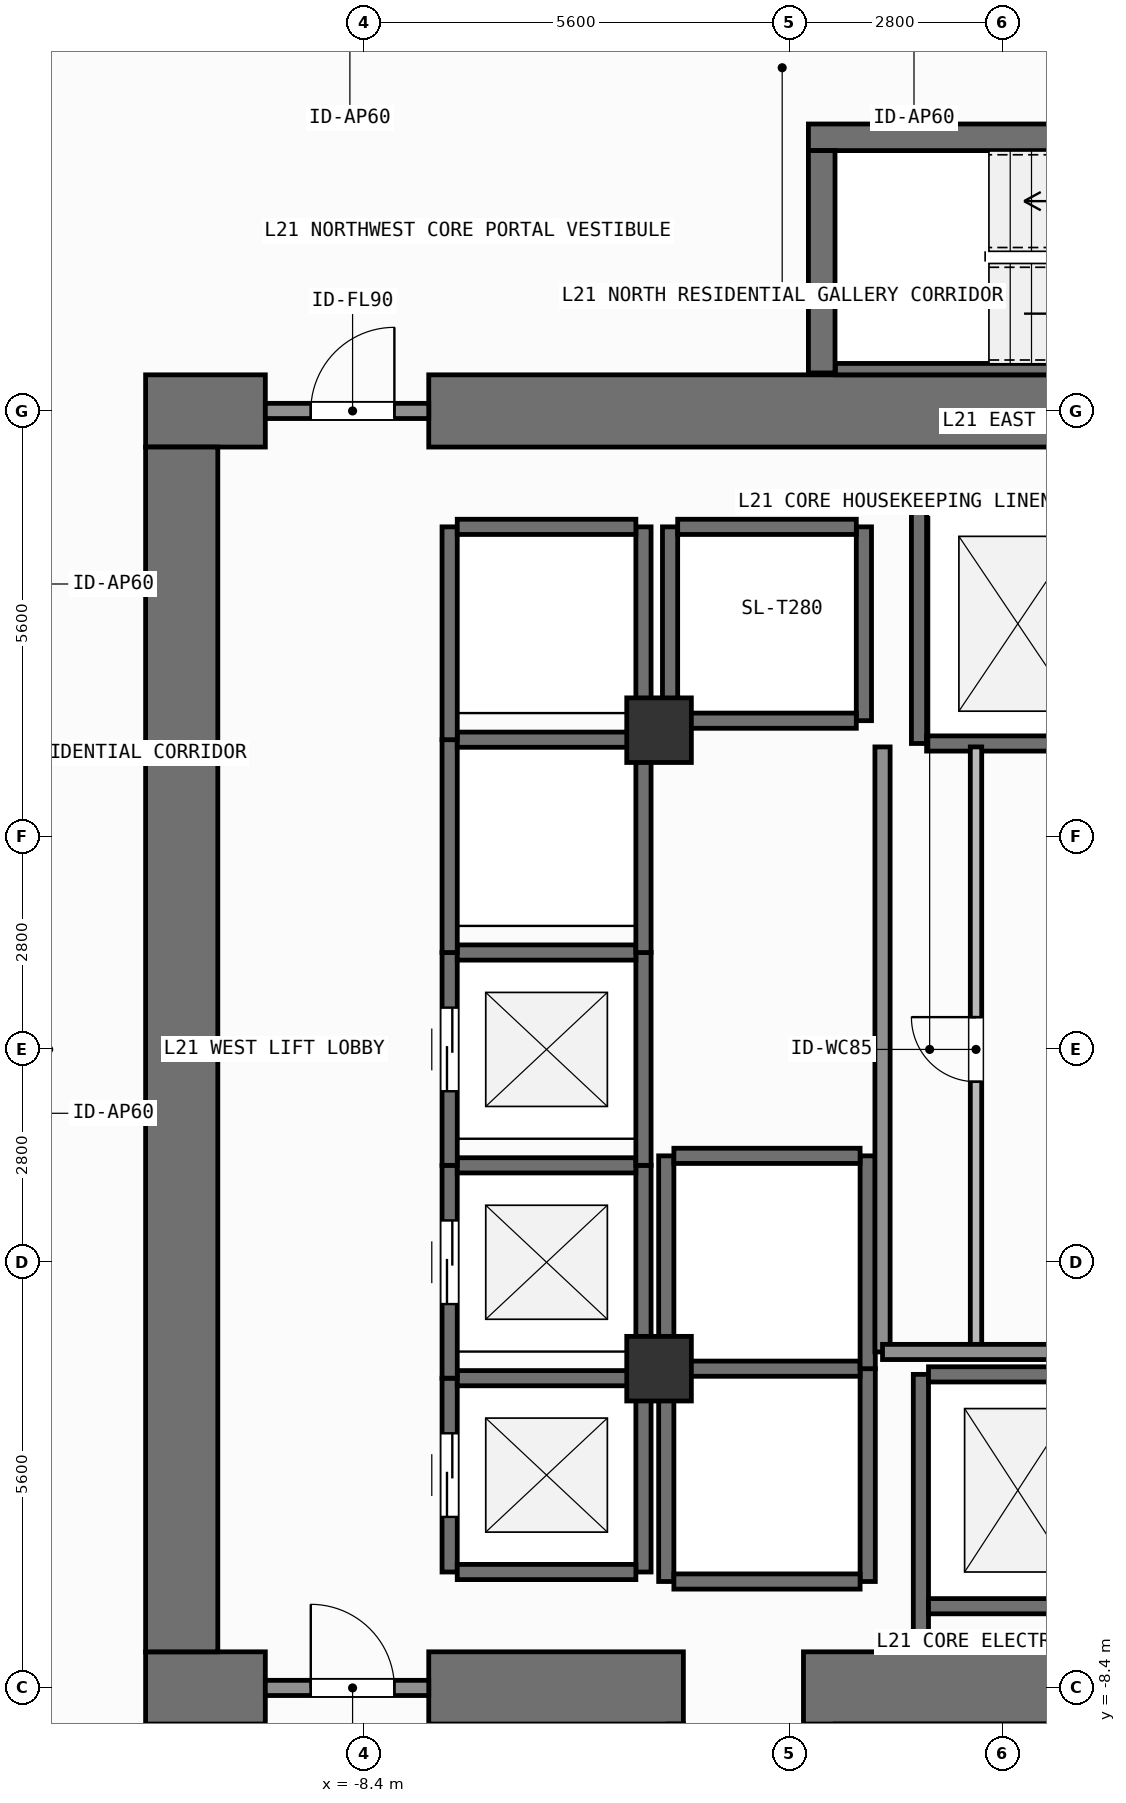
"""IFC4 building model, lengths in metres.
Left out: names, types, materials, properties, quantities, classifications, styles, units other than length and angle.
Written with IfcOpenShell. Run it as: python <this file> out.ifc"""

import sys

from ifc_helpers import new_model, si_unit, direction, frame, frame_2d, origin, origin_2d, place, context, subcontext, project, spatial, rectangle, extrude, element, fill, save


model = new_model("IFC4")
c1 = context("Model", 3, precision=1e-05, world=origin(), true_north=direction((0.0, 1.0)))
c2 = subcontext(c1, "Body", "Model", "MODEL_VIEW")
j1 = project(units=[si_unit("LENGTHUNIT", "METRE"), si_unit("PLANEANGLEUNIT", "RADIAN")], contexts=[c1])
p1 = place(None, origin())
s1 = spatial("IfcSite", under=j1, at=p1, CompositionType="ELEMENT")
p2 = place(p1, origin())
s2 = spatial("IfcBuilding", under=s1, at=p2, CompositionType="ELEMENT")
p3 = place(p2, frame((0.0, 0.0, 85.2)))
s3 = spatial("IfcBuildingStorey", under=s2, at=p3, CompositionType="ELEMENT", Elevation=85.2)
p4 = place(p3, frame((-11.275, -8.4, 0.0), z_axis=(0.0, 0.0, 1.0), x_axis=(1.0, 0.0, 0.0)))
e1 = element("IfcWall", 1, at=p4, inside=s3, PredefinedType="SHEAR", context=c2, shape_type="SweptSolid", body=[
    extrude(rectangle(XDim=1.575, YDim=0.95, at=frame_2d((0.788, 0.0))), origin(), (0.0, 0.0, 1.0), 3.9),
])
p5 = place(p3, frame((-7.55, -8.4, 0.0), z_axis=(0.0, 0.0, 1.0), x_axis=(1.0, 0.0, 0.0)))
e2 = element("IfcWall", 2, at=p5, inside=s3, PredefinedType="SHEAR", context=c2, shape_type="SweptSolid", body=[
    extrude(rectangle(XDim=3.35, YDim=0.95, at=frame_2d((1.675, 0.0))), origin(), (0.0, 0.0, 1.0), 3.9),
])
p6 = place(p3, frame((-2.62, -8.4, 0.0), z_axis=(0.0, 0.0, 1.0), x_axis=(1.0, 0.0, 0.0)))
e3 = element("IfcWall", 3, at=p6, inside=s3, PredefinedType="SHEAR", context=c2, shape_type="SweptSolid", body=[
    extrude(rectangle(XDim=7.27, YDim=0.95, at=frame_2d((3.635, 0.0))), origin(), (0.0, 0.0, 1.0), 3.9),
])
p7 = place(p3, frame((-11.275, 8.4, 0.0), z_axis=(0.0, 0.0, 1.0), x_axis=(1.0, 0.0, 0.0)))
e4 = element("IfcWall", 4, at=p7, inside=s3, PredefinedType="SHEAR", context=c2, shape_type="SweptSolid", body=[
    extrude(rectangle(XDim=1.575, YDim=0.95, at=frame_2d((0.788, 0.0))), origin(), (0.0, 0.0, 1.0), 3.9),
])
p8 = place(p3, frame((-7.55, 8.4, 0.0), z_axis=(0.0, 0.0, 1.0), x_axis=(1.0, 0.0, 0.0)))
e5 = element("IfcWall", 5, at=p8, inside=s3, PredefinedType="SHEAR", context=c2, shape_type="SweptSolid", body=[
    extrude(rectangle(XDim=16.425, YDim=0.95, at=frame_2d((8.212, 0.0))), origin(), (0.0, 0.0, 1.0), 3.9),
])
p9 = place(p3, frame((-10.8, -7.925, 0.0), z_axis=(0.0, 0.0, 1.0), x_axis=(0.0, 1.0, 0.0)))
e6 = element("IfcWall", 6, at=p9, inside=s3, PredefinedType="SHEAR", context=c2, shape_type="SweptSolid", body=[
    extrude(rectangle(XDim=15.85, YDim=0.95, at=frame_2d((7.925, 0.0))), origin(), (0.0, 0.0, 1.0), 3.9),
])
p10 = place(p3, frame((-2.555, 12.0, 0.0), z_axis=(0.0, 0.0, 1.0), x_axis=(1.0, 0.0, 0.0)))
e7 = element("IfcWall", 7, at=p10, inside=s3, PredefinedType="SHEAR", context=c2, shape_type="SweptSolid", body=[
    extrude(rectangle(XDim=7.31, YDim=0.35, at=frame_2d((3.655, 0.0))), origin(), (0.0, 0.0, 1.0), 3.9),
])
p11 = place(p3, frame((-2.2, 8.95, 0.0), z_axis=(0.0, 0.0, 1.0), x_axis=(1.0, 0.0, 0.0)))
e8 = element("IfcWall", 8, at=p11, inside=s3, PredefinedType="SHEAR", context=c2, shape_type="SweptSolid", body=[
    extrude(rectangle(XDim=6.6, YDim=0.15, at=frame_2d((3.3, 0.0))), origin(), (0.0, 0.0, 1.0), 3.9),
])
p12 = place(p3, frame((-2.38, 8.9, 0.0), z_axis=(0.0, 0.0, 1.0), x_axis=(0.0, 1.0, 0.0)))
e9 = element("IfcWall", 9, at=p12, inside=s3, PredefinedType="SHEAR", context=c2, shape_type="SweptSolid", body=[
    extrude(rectangle(XDim=2.925, YDim=0.35, at=frame_2d((1.462, 0.0))), origin(), (0.0, 0.0, 1.0), 3.9),
])
for number, where, z_axis, x_axis in (
    (10, (-4.52, -4.2, 0.0), (0.0, 0.0, 1.0), (1.0, 0.0, 0.0)),
    (11, (-4.52, 4.2, 0.0), (0.0, 0.0, 1.0), (1.0, 0.0, 0.0)),
):
    element("IfcColumn", number, at=place(p3, frame(where, z_axis=z_axis, x_axis=x_axis)), inside=s3, PredefinedType="COLUMN", context=c2, shape_type="SweptSolid", body=[
        extrude(rectangle(XDim=0.85, YDim=0.85, at=origin_2d()), origin(), (0.0, 0.0, 1.0), 3.9),
    ])
p13 = place(p3, frame((-7.275, -6.875, 0.0), z_axis=(0.0, 0.0, 1.0), x_axis=(0.0, 1.0, 0.0)))
e12 = element("IfcWall", 12, at=p13, inside=s3, PredefinedType="SHEAR", context=c2, shape_type="SweptSolid", body=[
    extrude(rectangle(XDim=2.55, YDim=0.2, at=frame_2d((1.275, 0.0))), origin(), (0.0, 0.0, 1.0), 3.68),
])
p14 = place(p13, frame((0.725, 0.0, 0.0)))
e13 = element("IfcOpeningElement", 13, at=p14, cuts=e12, PredefinedType="OPENING", context=c2, shape_type="SweptSolid", body=[
    extrude(rectangle(XDim=1.1, YDim=2.2, at=frame_2d((0.55, 1.1))), frame((0.0, 0.11, 0.0), z_axis=(0.0, -1.0, 0.0), x_axis=(1.0, 0.0, 0.0)), (0.0, 0.0, 1.0), 0.22),
])
p15 = place(p3, frame((-4.725, -6.875, 0.0), z_axis=(0.0, 0.0, 1.0), x_axis=(0.0, 1.0, 0.0)))
e14 = element("IfcWall", 14, at=p15, inside=s3, PredefinedType="SHEAR", context=c2, shape_type="SweptSolid", body=[
    extrude(rectangle(XDim=2.55, YDim=0.2, at=frame_2d((1.275, 0.0))), origin(), (0.0, 0.0, 1.0), 3.68),
])
for number, where, z_axis, x_axis in (
    (15, (-7.175, -6.875, 0.0), (0.0, 0.0, 1.0), (1.0, 0.0, 0.0)),
    (16, (-7.175, -4.325, 0.0), (0.0, 0.0, 1.0), (1.0, 0.0, 0.0)),
):
    element("IfcWall", number, at=place(p3, frame(where, z_axis=z_axis, x_axis=x_axis)), inside=s3, PredefinedType="SHEAR", context=c2, shape_type="SweptSolid", body=[
        extrude(rectangle(XDim=2.35, YDim=0.2, at=frame_2d((1.175, 0.0))), origin(), (0.0, 0.0, 1.0), 3.68),
    ])
p16 = place(p3, frame((-7.275, -4.325, 0.0), z_axis=(0.0, 0.0, 1.0), x_axis=(0.0, 1.0, 0.0)))
e17 = element("IfcWall", 17, at=p16, inside=s3, PredefinedType="SHEAR", context=c2, shape_type="SweptSolid", body=[
    extrude(rectangle(XDim=2.8, YDim=0.2, at=frame_2d((1.4, 0.0))), origin(), (0.0, 0.0, 1.0), 3.68),
])
p17 = place(p16, frame((0.975, 0.0, 0.0)))
e18 = element("IfcOpeningElement", 18, at=p17, cuts=e17, PredefinedType="OPENING", context=c2, shape_type="SweptSolid", body=[
    extrude(rectangle(XDim=1.1, YDim=2.2, at=frame_2d((0.55, 1.1))), frame((0.0, 0.11, 0.0), z_axis=(0.0, -1.0, 0.0), x_axis=(1.0, 0.0, 0.0)), (0.0, 0.0, 1.0), 0.22),
])
p18 = place(p3, frame((-4.725, -4.325, 0.0), z_axis=(0.0, 0.0, 1.0), x_axis=(0.0, 1.0, 0.0)))
e19 = element("IfcWall", 19, at=p18, inside=s3, PredefinedType="SHEAR", context=c2, shape_type="SweptSolid", body=[
    extrude(rectangle(XDim=2.8, YDim=0.2, at=frame_2d((1.4, 0.0))), origin(), (0.0, 0.0, 1.0), 3.68),
])
p19 = place(p3, frame((-7.175, -1.525, 0.0), z_axis=(0.0, 0.0, 1.0), x_axis=(1.0, 0.0, 0.0)))
e20 = element("IfcWall", 20, at=p19, inside=s3, PredefinedType="SHEAR", context=c2, shape_type="SweptSolid", body=[
    extrude(rectangle(XDim=2.35, YDim=0.2, at=frame_2d((1.175, 0.0))), origin(), (0.0, 0.0, 1.0), 3.68),
])
p20 = place(p3, frame((-7.275, -1.525, 0.0), z_axis=(0.0, 0.0, 1.0), x_axis=(0.0, 1.0, 0.0)))
e21 = element("IfcWall", 21, at=p20, inside=s3, PredefinedType="SHEAR", context=c2, shape_type="SweptSolid", body=[
    extrude(rectangle(XDim=2.8, YDim=0.2, at=frame_2d((1.4, 0.0))), origin(), (0.0, 0.0, 1.0), 3.68),
])
p21 = place(p20, frame((0.975, 0.0, 0.0)))
e22 = element("IfcOpeningElement", 22, at=p21, cuts=e21, PredefinedType="OPENING", context=c2, shape_type="SweptSolid", body=[
    extrude(rectangle(XDim=1.1, YDim=2.2, at=frame_2d((0.55, 1.1))), frame((0.0, 0.11, 0.0), z_axis=(0.0, -1.0, 0.0), x_axis=(1.0, 0.0, 0.0)), (0.0, 0.0, 1.0), 0.22),
])
p22 = place(p3, frame((-4.725, -1.525, 0.0), z_axis=(0.0, 0.0, 1.0), x_axis=(0.0, 1.0, 0.0)))
e23 = element("IfcWall", 23, at=p22, inside=s3, PredefinedType="SHEAR", context=c2, shape_type="SweptSolid", body=[
    extrude(rectangle(XDim=2.8, YDim=0.2, at=frame_2d((1.4, 0.0))), origin(), (0.0, 0.0, 1.0), 3.68),
])
p23 = place(p3, frame((-7.175, 1.275, 0.0), z_axis=(0.0, 0.0, 1.0), x_axis=(1.0, 0.0, 0.0)))
e24 = element("IfcWall", 24, at=p23, inside=s3, PredefinedType="SHEAR", context=c2, shape_type="SweptSolid", body=[
    extrude(rectangle(XDim=2.35, YDim=0.2, at=frame_2d((1.175, 0.0))), origin(), (0.0, 0.0, 1.0), 3.68),
])
for number, where, z_axis, x_axis in (
    (25, (-7.275, 1.275, 0.0), (0.0, 0.0, 1.0), (0.0, 1.0, 0.0)),
    (26, (-4.725, 1.275, 0.0), (0.0, 0.0, 1.0), (0.0, 1.0, 0.0)),
):
    element("IfcWall", number, at=place(p3, frame(where, z_axis=z_axis, x_axis=x_axis)), inside=s3, PredefinedType="SHEAR", context=c2, shape_type="SweptSolid", body=[
        extrude(rectangle(XDim=2.8, YDim=0.2, at=frame_2d((1.4, 0.0))), origin(), (0.0, 0.0, 1.0), 3.68),
    ])
p24 = place(p3, frame((-7.175, 4.075, 0.0), z_axis=(0.0, 0.0, 1.0), x_axis=(1.0, 0.0, 0.0)))
e27 = element("IfcWall", 27, at=p24, inside=s3, PredefinedType="SHEAR", context=c2, shape_type="SweptSolid", body=[
    extrude(rectangle(XDim=2.35, YDim=0.2, at=frame_2d((1.175, 0.0))), origin(), (0.0, 0.0, 1.0), 3.68),
])
for number, where, z_axis, x_axis in (
    (28, (-7.275, 4.075, 0.0), (0.0, 0.0, 1.0), (0.0, 1.0, 0.0)),
    (29, (-4.725, 4.075, 0.0), (0.0, 0.0, 1.0), (0.0, 1.0, 0.0)),
):
    element("IfcWall", number, at=place(p3, frame(where, z_axis=z_axis, x_axis=x_axis)), inside=s3, PredefinedType="SHEAR", context=c2, shape_type="SweptSolid", body=[
        extrude(rectangle(XDim=2.8, YDim=0.2, at=frame_2d((1.4, 0.0))), origin(), (0.0, 0.0, 1.0), 3.68),
    ])
p25 = place(p3, frame((-7.175, 6.875, 0.0), z_axis=(0.0, 0.0, 1.0), x_axis=(1.0, 0.0, 0.0)))
e30 = element("IfcWall", 30, at=p25, inside=s3, PredefinedType="SHEAR", context=c2, shape_type="SweptSolid", body=[
    extrude(rectangle(XDim=2.35, YDim=0.2, at=frame_2d((1.175, 0.0))), origin(), (0.0, 0.0, 1.0), 3.68),
])
for number, where, z_axis, x_axis in (
    (31, (-4.375, 4.325, 0.0), (0.0, 0.0, 1.0), (0.0, 1.0, 0.0)),
    (32, (-1.825, 4.325, 0.0), (0.0, 0.0, 1.0), (0.0, 1.0, 0.0)),
):
    element("IfcWall", number, at=place(p3, frame(where, z_axis=z_axis, x_axis=x_axis)), inside=s3, PredefinedType="SHEAR", context=c2, shape_type="SweptSolid", body=[
        extrude(rectangle(XDim=2.55, YDim=0.2, at=frame_2d((1.275, 0.0))), origin(), (0.0, 0.0, 1.0), 3.68),
    ])
for number, where, z_axis, x_axis in (
    (33, (-4.275, 4.325, 0.0), (0.0, 0.0, 1.0), (1.0, 0.0, 0.0)),
    (34, (-4.275, 6.875, 0.0), (0.0, 0.0, 1.0), (1.0, 0.0, 0.0)),
):
    element("IfcWall", number, at=place(p3, frame(where, z_axis=z_axis, x_axis=x_axis)), inside=s3, PredefinedType="SHEAR", context=c2, shape_type="SweptSolid", body=[
        extrude(rectangle(XDim=2.35, YDim=0.2, at=frame_2d((1.175, 0.0))), origin(), (0.0, 0.0, 1.0), 3.68),
    ])
for number, where, z_axis, x_axis in (
    (35, (-4.425, -7.0, 0.0), (0.0, 0.0, 1.0), (0.0, 1.0, 0.0)),
    (36, (-1.775, -7.0, 0.0), (0.0, 0.0, 1.0), (0.0, 1.0, 0.0)),
):
    element("IfcWall", number, at=place(p3, frame(where, z_axis=z_axis, x_axis=x_axis)), inside=s3, PredefinedType="SHEAR", context=c2, shape_type="SweptSolid", body=[
        extrude(rectangle(XDim=2.8, YDim=0.2, at=frame_2d((1.4, 0.0))), origin(), (0.0, 0.0, 1.0), 3.68),
    ])
for number, where, z_axis, x_axis in (
    (37, (-4.325, -7.0, 0.0), (0.0, 0.0, 1.0), (1.0, 0.0, 0.0)),
    (38, (-4.325, -4.2, 0.0), (0.0, 0.0, 1.0), (1.0, 0.0, 0.0)),
):
    element("IfcWall", number, at=place(p3, frame(where, z_axis=z_axis, x_axis=x_axis)), inside=s3, PredefinedType="SHEAR", context=c2, shape_type="SweptSolid", body=[
        extrude(rectangle(XDim=2.45, YDim=0.2, at=frame_2d((1.225, 0.0))), origin(), (0.0, 0.0, 1.0), 3.68),
    ])
for number, where, z_axis, x_axis in (
    (39, (-4.425, -4.2, 0.0), (0.0, 0.0, 1.0), (0.0, 1.0, 0.0)),
    (40, (-1.775, -4.2, 0.0), (0.0, 0.0, 1.0), (0.0, 1.0, 0.0)),
):
    element("IfcWall", number, at=place(p3, frame(where, z_axis=z_axis, x_axis=x_axis)), inside=s3, PredefinedType="SHEAR", context=c2, shape_type="SweptSolid", body=[
        extrude(rectangle(XDim=2.8, YDim=0.2, at=frame_2d((1.4, 0.0))), origin(), (0.0, 0.0, 1.0), 3.68),
    ])
p26 = place(p3, frame((-4.325, -1.4, 0.0), z_axis=(0.0, 0.0, 1.0), x_axis=(1.0, 0.0, 0.0)))
e41 = element("IfcWall", 41, at=p26, inside=s3, PredefinedType="SHEAR", context=c2, shape_type="SweptSolid", body=[
    extrude(rectangle(XDim=2.45, YDim=0.2, at=frame_2d((1.225, 0.0))), origin(), (0.0, 0.0, 1.0), 3.68),
])
p27 = place(p3, frame((-1.1, 4.025, 0.0), z_axis=(0.0, 0.0, 1.0), x_axis=(0.0, 1.0, 0.0)))
e42 = element("IfcWall", 42, at=p27, inside=s3, PredefinedType="SHEAR", context=c2, shape_type="SweptSolid", body=[
    extrude(rectangle(XDim=3.15, YDim=0.2, at=frame_2d((1.575, 0.0))), origin(), (0.0, 0.0, 1.0), 3.68),
])
for number, where, z_axis, x_axis in (
    (43, (-1.0, 4.025, 0.0), (0.0, 0.0, 1.0), (1.0, 0.0, 0.0)),
    (44, (-1.0, 7.175, 0.0), (0.0, 0.0, 1.0), (1.0, 0.0, 0.0)),
):
    element("IfcWall", number, at=place(p3, frame(where, z_axis=z_axis, x_axis=x_axis)), inside=s3, PredefinedType="SHEAR", context=c2, shape_type="SweptSolid", body=[
        extrude(rectangle(XDim=2.4, YDim=0.2, at=frame_2d((1.2, 0.0))), origin(), (0.0, 0.0, 1.0), 3.68),
    ])
p28 = place(p3, frame((-1.075, -7.925, 0.0), z_axis=(0.0, 0.0, 1.0), x_axis=(0.0, 1.0, 0.0)))
e45 = element("IfcWall", 45, at=p28, inside=s3, PredefinedType="SHEAR", context=c2, shape_type="SweptSolid", body=[
    extrude(rectangle(XDim=3.65, YDim=0.2, at=frame_2d((1.825, 0.0))), origin(), (0.0, 0.0, 1.0), 3.68),
])
for number, where, z_axis, x_axis in (
    (46, (-0.975, -7.325, 0.0), (0.0, 0.0, 1.0), (1.0, 0.0, 0.0)),
    (47, (-0.975, -4.275, 0.0), (0.0, 0.0, 1.0), (1.0, 0.0, 0.0)),
):
    element("IfcWall", number, at=place(p3, frame(where, z_axis=z_axis, x_axis=x_axis)), inside=s3, PredefinedType="SHEAR", context=c2, shape_type="SweptSolid", body=[
        extrude(rectangle(XDim=2.35, YDim=0.2, at=frame_2d((1.175, 0.0))), origin(), (0.0, 0.0, 1.0), 3.68),
    ])
p29 = place(p3, frame((-9.7, -8.4, 0.0), z_axis=(0.0, 0.0, 1.0), x_axis=(1.0, 0.0, 0.0)))
e48 = element("IfcWall", 48, at=p29, inside=s3, PredefinedType="SOLIDWALL", context=c2, shape_type="SweptSolid", body=[
    extrude(rectangle(XDim=2.15, YDim=0.2, at=frame_2d((1.075, 0.0))), origin(), (0.0, 0.0, 1.0), 2.72),
])
p30 = place(p29, frame((0.598, 0.0, 0.0)))
e49 = element("IfcOpeningElement", 49, at=p30, cuts=e48, PredefinedType="OPENING", context=c2, shape_type="SweptSolid", body=[
    extrude(rectangle(XDim=1.1, YDim=2.15, at=frame_2d((0.55, 1.075))), frame((0.0, 0.11, 0.0), z_axis=(0.0, -1.0, 0.0), x_axis=(1.0, 0.0, 0.0)), (0.0, 0.0, 1.0), 0.22),
])
p31 = place(p3, frame((-9.7, 8.4, 0.0), z_axis=(0.0, 0.0, 1.0), x_axis=(1.0, 0.0, 0.0)))
e50 = element("IfcWall", 50, at=p31, inside=s3, PredefinedType="SOLIDWALL", context=c2, shape_type="SweptSolid", body=[
    extrude(rectangle(XDim=2.15, YDim=0.2, at=frame_2d((1.075, 0.0))), origin(), (0.0, 0.0, 1.0), 2.72),
])
p32 = place(p31, frame((0.598, 0.0, 0.0)))
e51 = element("IfcOpeningElement", 51, at=p32, cuts=e50, PredefinedType="OPENING", context=c2, shape_type="SweptSolid", body=[
    extrude(rectangle(XDim=1.1, YDim=2.15, at=frame_2d((0.55, 1.075))), frame((0.0, 0.11, 0.0), z_axis=(0.0, -1.0, 0.0), x_axis=(1.0, 0.0, 0.0)), (0.0, 0.0, 1.0), 0.22),
])
p33 = place(p3, frame((-0.35, -3.98, 0.0), z_axis=(0.0, 0.0, 1.0), x_axis=(0.0, 1.0, 0.0)))
e52 = element("IfcWall", 52, at=p33, inside=s3, PredefinedType="PARTITIONING", context=c2, shape_type="SweptSolid", body=[
    extrude(rectangle(XDim=7.96, YDim=0.15, at=frame_2d((3.98, 0.0))), origin(), (0.0, 0.0, 1.0), 3.68),
])
p34 = place(p33, frame((3.555, 0.0, 0.0)))
e53 = element("IfcOpeningElement", 53, at=p34, cuts=e52, PredefinedType="OPENING", context=c2, shape_type="SweptSolid", body=[
    extrude(rectangle(XDim=0.85, YDim=2.1, at=frame_2d((0.425, 1.05))), frame((0.0, 0.085, 0.0), z_axis=(0.0, -1.0, 0.0), x_axis=(1.0, 0.0, 0.0)), (0.0, 0.0, 1.0), 0.17),
])
p35 = place(p3, frame((-1.58, -3.98, 0.0), z_axis=(0.0, 0.0, 1.0), x_axis=(0.0, 1.0, 0.0)))
e54 = element("IfcWall", 54, at=p35, inside=s3, PredefinedType="SOLIDWALL", context=c2, shape_type="SweptSolid", body=[
    extrude(rectangle(XDim=7.96, YDim=0.2, at=frame_2d((3.98, 0.0))), origin(), (0.0, 0.0, 1.0), 3.68),
])
p36 = place(p3, frame((-1.58, -3.98, 0.0), z_axis=(0.0, 0.0, 1.0), x_axis=(1.0, 0.0, 0.0)))
e55 = element("IfcWall", 55, at=p36, inside=s3, PredefinedType="SOLIDWALL", context=c2, shape_type="SweptSolid", body=[
    extrude(rectangle(XDim=3.19, YDim=0.2, at=frame_2d((1.595, 0.0))), origin(), (0.0, 0.0, 1.0), 3.68),
])
p37 = place(p14, origin())
e56 = element("IfcDoor", 56, at=p37, inside=s3, OperationType="SLIDING_TO_LEFT", PredefinedType="DOOR", context=c2, shape_type="SweptSolid", body=[
    extrude(rectangle(XDim=1.1, YDim=2.2, at=frame_2d((0.55, 1.1))), frame((0.0, 0.025, 0.0), z_axis=(0.0, -1.0, 0.0), x_axis=(1.0, 0.0, 0.0)), (0.0, 0.0, 1.0), 0.05),
])
fill(e13, e56)
p38 = place(p17, origin())
e57 = element("IfcDoor", 57, at=p38, inside=s3, OperationType="SLIDING_TO_LEFT", PredefinedType="DOOR", context=c2, shape_type="SweptSolid", body=[
    extrude(rectangle(XDim=1.1, YDim=2.2, at=frame_2d((0.55, 1.1))), frame((0.0, 0.025, 0.0), z_axis=(0.0, -1.0, 0.0), x_axis=(1.0, 0.0, 0.0)), (0.0, 0.0, 1.0), 0.05),
])
fill(e18, e57)
p39 = place(p21, origin())
e58 = element("IfcDoor", 58, at=p39, inside=s3, OperationType="SLIDING_TO_LEFT", PredefinedType="DOOR", context=c2, shape_type="SweptSolid", body=[
    extrude(rectangle(XDim=1.1, YDim=2.2, at=frame_2d((0.55, 1.1))), frame((0.0, 0.025, 0.0), z_axis=(0.0, -1.0, 0.0), x_axis=(1.0, 0.0, 0.0)), (0.0, 0.0, 1.0), 0.05),
])
fill(e22, e58)
p40 = place(p30, origin())
e59 = element("IfcDoor", 59, at=p40, inside=s3, OperationType="SINGLE_SWING_LEFT", PredefinedType="DOOR", context=c2, shape_type="SweptSolid", body=[
    extrude(rectangle(XDim=1.1, YDim=2.15, at=frame_2d((0.55, 1.075))), frame((0.0, 0.025, 0.0), z_axis=(0.0, -1.0, 0.0), x_axis=(1.0, 0.0, 0.0)), (0.0, 0.0, 1.0), 0.05),
])
fill(e49, e59)
p41 = place(p32, origin())
e60 = element("IfcDoor", 60, at=p41, inside=s3, OperationType="SINGLE_SWING_RIGHT", PredefinedType="DOOR", context=c2, shape_type="SweptSolid", body=[
    extrude(rectangle(XDim=1.1, YDim=2.15, at=frame_2d((0.55, 1.075))), frame((0.0, 0.025, 0.0), z_axis=(0.0, -1.0, 0.0), x_axis=(1.0, 0.0, 0.0)), (0.0, 0.0, 1.0), 0.05),
])
fill(e51, e60)
p42 = place(p34, origin())
e61 = element("IfcDoor", 61, at=p42, inside=s3, OperationType="SINGLE_SWING_RIGHT", PredefinedType="DOOR", context=c2, shape_type="SweptSolid", body=[
    extrude(rectangle(XDim=0.85, YDim=2.1, at=frame_2d((0.425, 1.05))), frame((0.0, 0.025, 0.0), z_axis=(0.0, -1.0, 0.0), x_axis=(1.0, 0.0, 0.0)), (0.0, 0.0, 1.0), 0.05),
])
fill(e53, e61)
save(model, sys.argv[1])
